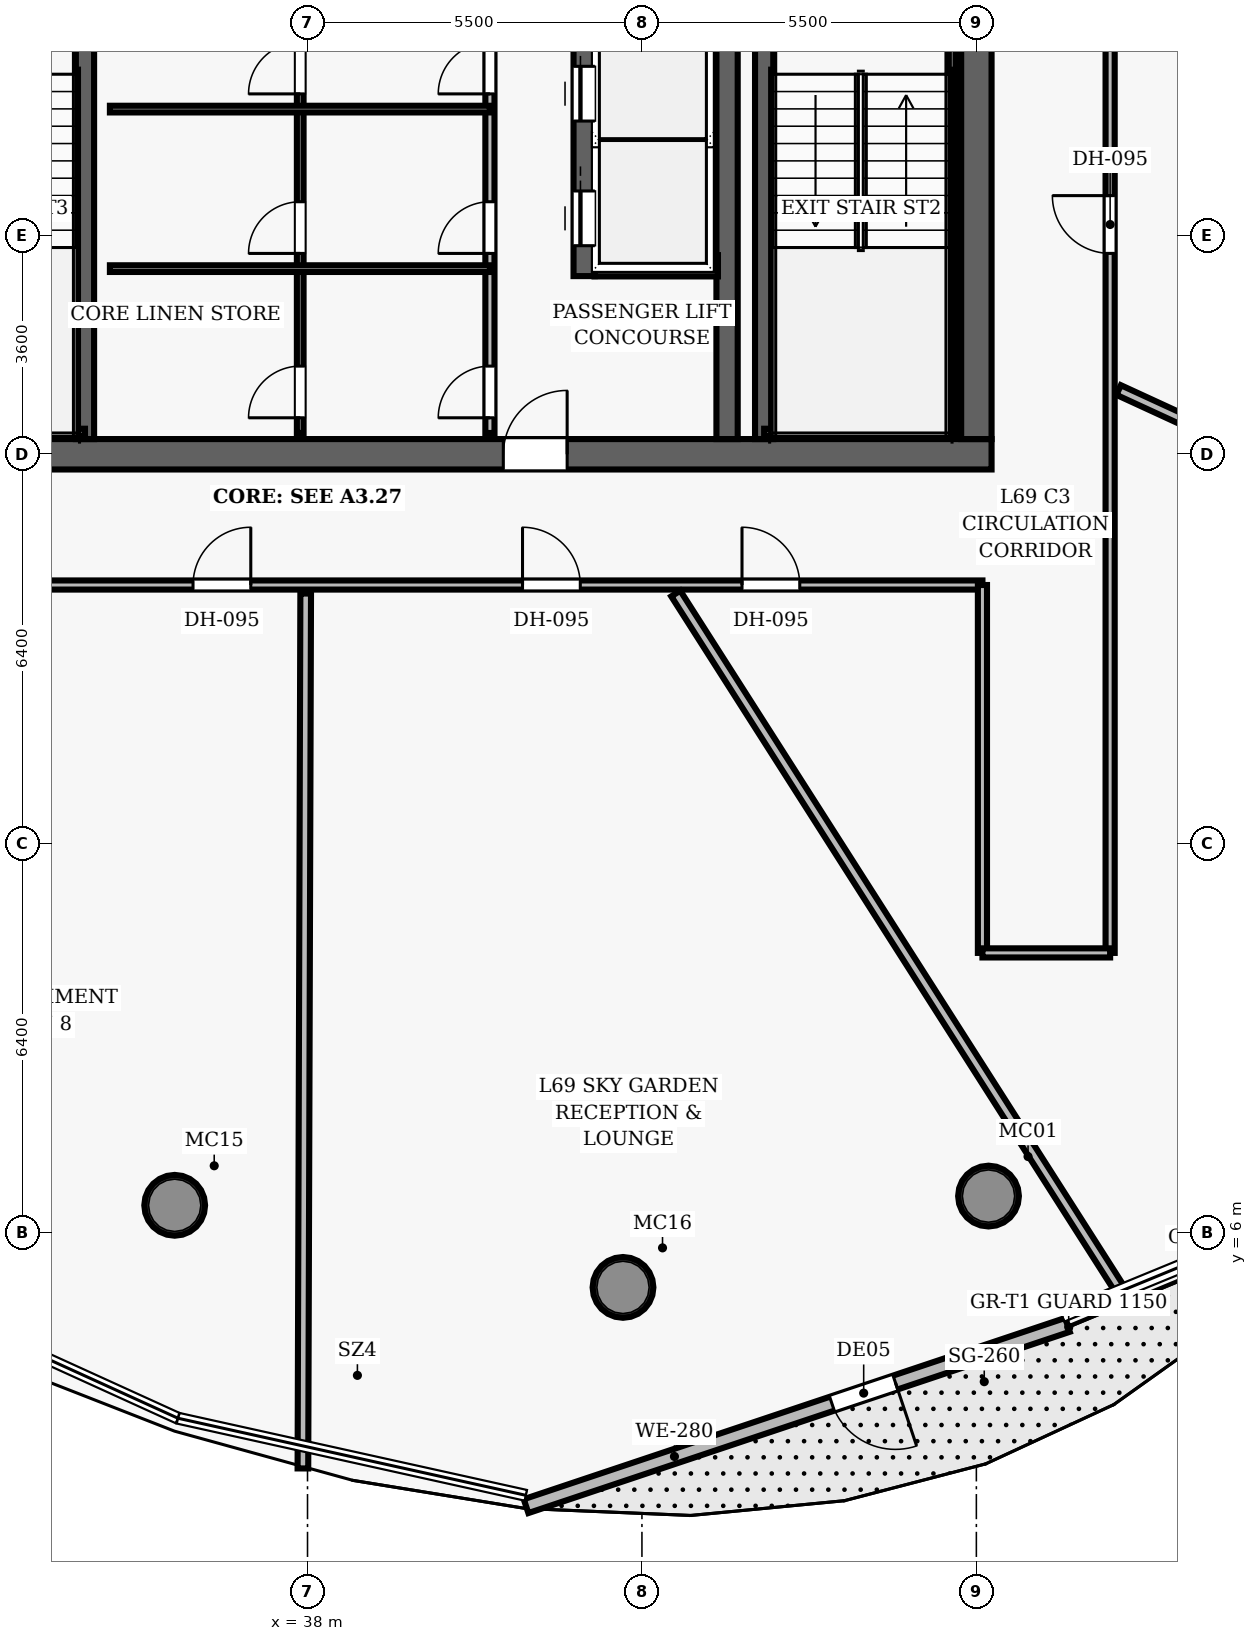
"""IFC4 building model, lengths in metres.
Left out: names, types, materials, properties, quantities, classifications, styles, units other than length and angle.
Written with IfcOpenShell. Run it as: python <this file> out.ifc"""

import sys

from ifc_helpers import new_model, si_unit, direction, frame, frame_2d, origin, origin_2d, place, context, subcontext, project, spatial, rectangle, hollow_circle, extrude, element, fill, save


model = new_model("IFC4")
c1 = context("Model", 3, precision=1e-05, world=origin(), true_north=direction((0.0, 1.0)))
c2 = subcontext(c1, "Body", "Model", "MODEL_VIEW")
j1 = project(units=[si_unit("LENGTHUNIT", "METRE"), si_unit("PLANEANGLEUNIT", "RADIAN")], contexts=[c1])
p1 = place(None, origin())
s1 = spatial("IfcSite", under=j1, at=p1, CompositionType="ELEMENT")
p2 = place(p1, origin())
s2 = spatial("IfcBuilding", under=s1, at=p2, CompositionType="ELEMENT")
p3 = place(p2, frame((0.0, 0.0, 272.85)))
s3 = spatial("IfcBuildingStorey", under=s2, at=p3, CompositionType="ELEMENT", Elevation=272.85)
p4 = place(p3, frame((26.75, 18.8, 0.0), z_axis=(0.0, 0.0, 1.0), x_axis=(1.0, 0.0, 0.0)))
e1 = element("IfcWall", 1, at=p4, inside=s3, PredefinedType="SHEAR", context=c2, shape_type="SweptSolid", body=[
    extrude(rectangle(XDim=22.5, YDim=0.5, at=frame_2d((11.25, 0.0))), origin(), (0.0, 0.0, 1.0), 3.85),
])
p5 = place(p4, frame((14.47, 0.0, 0.0)))
e2 = element("IfcOpeningElement", 2, at=p5, cuts=e1, PredefinedType="OPENING", context=c2, shape_type="SweptSolid", body=[
    extrude(rectangle(XDim=1.05, YDim=2.15, at=frame_2d((0.525, 1.075))), frame((0.0, 0.26, 0.0), z_axis=(0.0, -1.0, 0.0), x_axis=(1.0, 0.0, 0.0)), (0.0, 0.0, 1.0), 0.52),
])
p6 = place(p3, frame((49.0, 19.05, 0.0), z_axis=(0.0, 0.0, 1.0), x_axis=(0.0, 1.0, 0.0)))
e3 = element("IfcWall", 3, at=p6, inside=s3, PredefinedType="SHEAR", context=c2, shape_type="SweptSolid", body=[
    extrude(rectangle(XDim=13.9, YDim=0.5, at=frame_2d((6.95, 0.0))), origin(), (0.0, 0.0, 1.0), 3.85),
])
p7 = place(p6, frame((8.2, 0.0, 0.0)))
e4 = element("IfcOpeningElement", 4, at=p7, cuts=e3, PredefinedType="OPENING", context=c2, shape_type="SweptSolid", body=[
    extrude(rectangle(XDim=1.05, YDim=2.15, at=frame_2d((0.525, 1.075))), frame((0.0, 0.26, 0.0), z_axis=(0.0, -1.0, 0.0), x_axis=(1.0, 0.0, 0.0)), (0.0, 0.0, 1.0), 0.52),
])
p8 = place(p3, frame((44.9, 19.05, 0.0), z_axis=(0.0, 0.0, 1.0), x_axis=(0.0, 1.0, 0.0)))
e5 = element("IfcWall", 5, at=p8, inside=s3, PredefinedType="SHEAR", context=c2, shape_type="SweptSolid", body=[
    extrude(rectangle(XDim=13.9, YDim=0.35, at=frame_2d((6.95, 0.0))), origin(), (0.0, 0.0, 1.0), 3.85),
])
for number, where, z_axis, x_axis in (
    (6, (49.2, 6.601, 0.0), (0.0, 0.0, 1.0), (1.0, 0.0, 0.0)),
    (7, (35.815, 6.449, 0.0), (0.0, 0.0, 1.0), (1.0, 0.0, 0.0)),
    (8, (43.188, 5.099, 0.0), (0.0, 0.0, 1.0), (1.0, 0.0, 0.0)),
):
    element("IfcColumn", number, at=place(p3, frame(where, z_axis=z_axis, x_axis=x_axis)), inside=s3, PredefinedType="COLUMN", context=c2, shape_type="SweptSolid", body=[
        extrude(hollow_circle(Radius=0.5, WallThickness=0.045, at=origin_2d()), origin(), (0.0, 0.0, 1.0), 3.85),
    ])
p9 = place(p3, frame((45.51, 19.05, 0.0), z_axis=(0.0, 0.0, 1.0), x_axis=(0.0, 1.0, 0.0)))
e9 = element("IfcWall", 9, at=p9, inside=s3, PredefinedType="SHEAR", context=c2, shape_type="SweptSolid", body=[
    extrude(rectangle(XDim=7.5, YDim=0.3, at=frame_2d((3.75, 0.0))), origin(), (0.0, 0.0, 1.0), 3.85),
])
p10 = place(p3, frame((48.605, 19.1, 0.0), z_axis=(0.0, 0.0, 1.0), x_axis=(0.0, 1.0, 0.0)))
e10 = element("IfcWall", 10, at=p10, inside=s3, PredefinedType="SHEAR", context=c2, shape_type="SweptSolid", body=[
    extrude(rectangle(XDim=7.45, YDim=0.12, at=frame_2d((3.725, 0.0))), origin(), (0.0, 0.0, 1.0), 3.85),
])
p11 = place(p3, frame((45.51, 19.16, 0.0), z_axis=(0.0, 0.0, 1.0), x_axis=(1.0, 0.0, 0.0)))
e11 = element("IfcWall", 11, at=p11, inside=s3, PredefinedType="SHEAR", context=c2, shape_type="SweptSolid", body=[
    extrude(rectangle(XDim=3.095, YDim=0.12, at=frame_2d((1.547, 0.0))), origin(), (0.0, 0.0, 1.0), 3.85),
])
p12 = place(p3, frame((34.34, 19.05, 0.0), z_axis=(0.0, 0.0, 1.0), x_axis=(0.0, 1.0, 0.0)))
e12 = element("IfcWall", 12, at=p12, inside=s3, PredefinedType="SHEAR", context=c2, shape_type="SweptSolid", body=[
    extrude(rectangle(XDim=7.5, YDim=0.3, at=frame_2d((3.75, 0.0))), origin(), (0.0, 0.0, 1.0), 3.85),
])
p13 = place(p3, frame((31.3, 19.16, 0.0), z_axis=(0.0, 0.0, 1.0), x_axis=(1.0, 0.0, 0.0)))
e13 = element("IfcWall", 13, at=p13, inside=s3, PredefinedType="SHEAR", context=c2, shape_type="SweptSolid", body=[
    extrude(rectangle(XDim=3.04, YDim=0.12, at=frame_2d((1.52, 0.0))), origin(), (0.0, 0.0, 1.0), 3.85),
])
p14 = place(p3, frame((42.55, 21.73, 0.0), z_axis=(0.0, 0.0, 1.0), x_axis=(0.0, 1.0, 0.0)))
e14 = element("IfcWall", 14, at=p14, inside=s3, PredefinedType="SHEAR", context=c2, shape_type="SweptSolid", body=[
    extrude(rectangle(XDim=6.54, YDim=0.35, at=frame_2d((3.27, 0.0))), origin(), (0.0, 0.0, 1.0), 3.04),
])
p15 = place(p14, frame((0.5, 0.0, 0.0)))
e15 = element("IfcOpeningElement", 15, at=p15, cuts=e14, PredefinedType="OPENING", context=c2, shape_type="SweptSolid", body=[
    extrude(rectangle(XDim=0.9, YDim=2.15, at=frame_2d((0.45, 1.075))), frame((0.0, 0.185, 0.0), z_axis=(0.0, -1.0, 0.0), x_axis=(1.0, 0.0, 0.0)), (0.0, 0.0, 1.0), 0.37),
])
p16 = place(p14, frame((2.55, 0.0, 0.0)))
e16 = element("IfcOpeningElement", 16, at=p16, cuts=e14, PredefinedType="OPENING", context=c2, shape_type="SweptSolid", body=[
    extrude(rectangle(XDim=0.9, YDim=2.15, at=frame_2d((0.45, 1.075))), frame((0.0, 0.185, 0.0), z_axis=(0.0, -1.0, 0.0), x_axis=(1.0, 0.0, 0.0)), (0.0, 0.0, 1.0), 0.37),
])
p17 = place(p14, frame((4.6, 0.0, 0.0)))
e17 = element("IfcOpeningElement", 17, at=p17, cuts=e14, PredefinedType="OPENING", context=c2, shape_type="SweptSolid", body=[
    extrude(rectangle(XDim=0.9, YDim=2.15, at=frame_2d((0.45, 1.075))), frame((0.0, 0.185, 0.0), z_axis=(0.0, -1.0, 0.0), x_axis=(1.0, 0.0, 0.0)), (0.0, 0.0, 1.0), 0.37),
])
p18 = place(p3, frame((42.72, 21.9, 0.0), z_axis=(0.0, 0.0, 1.0), x_axis=(1.0, 0.0, 0.0)))
e18 = element("IfcWall", 18, at=p18, inside=s3, PredefinedType="SHEAR", context=c2, shape_type="SweptSolid", body=[
    extrude(rectangle(XDim=2.03, YDim=0.35, at=frame_2d((1.015, 0.0))), origin(), (0.0, 0.0, 1.0), 3.04),
])
p19 = place(p3, frame((41.0, 19.15, 0.0), z_axis=(0.0, 0.0, 1.0), x_axis=(0.0, 1.0, 0.0)))
e19 = element("IfcWall", 19, at=p19, inside=s3, PredefinedType="PARTITIONING", context=c2, shape_type="SweptSolid", body=[
    extrude(rectangle(XDim=7.95, YDim=0.15, at=frame_2d((3.975, 0.0))), origin(), (0.0, 0.0, 1.0), 3.04),
])
p20 = place(p19, frame((0.25, 0.0, 0.0)))
e20 = element("IfcOpeningElement", 20, at=p20, cuts=e19, PredefinedType="OPENING", context=c2, shape_type="SweptSolid", body=[
    extrude(rectangle(XDim=0.85, YDim=2.1, at=frame_2d((0.425, 1.05))), frame((0.0, 0.085, 0.0), z_axis=(0.0, -1.0, 0.0), x_axis=(1.0, 0.0, 0.0)), (0.0, 0.0, 1.0), 0.17),
])
p21 = place(p19, frame((2.953, 0.0, 0.0)))
e21 = element("IfcOpeningElement", 21, at=p21, cuts=e19, PredefinedType="OPENING", context=c2, shape_type="SweptSolid", body=[
    extrude(rectangle(XDim=0.85, YDim=2.1, at=frame_2d((0.425, 1.05))), frame((0.0, 0.085, 0.0), z_axis=(0.0, -1.0, 0.0), x_axis=(1.0, 0.0, 0.0)), (0.0, 0.0, 1.0), 0.17),
])
p22 = place(p19, frame((5.576, 0.0, 0.0)))
e22 = element("IfcOpeningElement", 22, at=p22, cuts=e19, PredefinedType="OPENING", context=c2, shape_type="SweptSolid", body=[
    extrude(rectangle(XDim=0.85, YDim=2.1, at=frame_2d((0.425, 1.05))), frame((0.0, 0.085, 0.0), z_axis=(0.0, -1.0, 0.0), x_axis=(1.0, 0.0, 0.0)), (0.0, 0.0, 1.0), 0.17),
])
p23 = place(p3, frame((37.88, 19.15, 0.0), z_axis=(0.0, 0.0, 1.0), x_axis=(0.0, 1.0, 0.0)))
e23 = element("IfcWall", 23, at=p23, inside=s3, PredefinedType="PARTITIONING", context=c2, shape_type="SweptSolid", body=[
    extrude(rectangle(XDim=7.95, YDim=0.11, at=frame_2d((3.975, 0.0))), origin(), (0.0, 0.0, 1.0), 3.04),
])
p24 = place(p23, frame((0.25, 0.0, 0.0)))
e24 = element("IfcOpeningElement", 24, at=p24, cuts=e23, PredefinedType="OPENING", context=c2, shape_type="SweptSolid", body=[
    extrude(rectangle(XDim=0.85, YDim=2.1, at=frame_2d((0.425, 1.05))), frame((0.0, 0.065, 0.0), z_axis=(0.0, -1.0, 0.0), x_axis=(1.0, 0.0, 0.0)), (0.0, 0.0, 1.0), 0.13),
])
p25 = place(p23, frame((2.953, 0.0, 0.0)))
e25 = element("IfcOpeningElement", 25, at=p25, cuts=e23, PredefinedType="OPENING", context=c2, shape_type="SweptSolid", body=[
    extrude(rectangle(XDim=0.85, YDim=2.1, at=frame_2d((0.425, 1.05))), frame((0.0, 0.065, 0.0), z_axis=(0.0, -1.0, 0.0), x_axis=(1.0, 0.0, 0.0)), (0.0, 0.0, 1.0), 0.13),
])
p26 = place(p23, frame((5.576, 0.0, 0.0)))
e26 = element("IfcOpeningElement", 26, at=p26, cuts=e23, PredefinedType="OPENING", context=c2, shape_type="SweptSolid", body=[
    extrude(rectangle(XDim=0.85, YDim=2.1, at=frame_2d((0.425, 1.05))), frame((0.0, 0.065, 0.0), z_axis=(0.0, -1.0, 0.0), x_axis=(1.0, 0.0, 0.0)), (0.0, 0.0, 1.0), 0.13),
])
for number, where, z_axis, x_axis in (
    (27, (34.75, 21.853, 0.0), (0.0, 0.0, 1.0), (1.0, 0.0, 0.0)),
    (28, (34.75, 24.477, 0.0), (0.0, 0.0, 1.0), (1.0, 0.0, 0.0)),
):
    element("IfcWall", number, at=place(p3, frame(where, z_axis=z_axis, x_axis=x_axis)), inside=s3, PredefinedType="PARTITIONING", context=c2, shape_type="SweptSolid", body=[
        extrude(rectangle(XDim=6.25, YDim=0.11, at=frame_2d((3.125, 0.0))), origin(), (0.0, 0.0, 1.0), 3.04),
    ])
p27 = place(p3, frame((26.9, 16.65, 0.0), z_axis=(0.0, 0.0, 1.0), x_axis=(1.0, 0.0, 0.0)))
e29 = element("IfcWall", 29, at=p27, inside=s3, PredefinedType="PARTITIONING", context=c2, shape_type="SweptSolid", body=[
    extrude(rectangle(XDim=22.2, YDim=0.15, at=frame_2d((11.1, 0.0))), origin(), (0.0, 0.0, 1.0), 3.04),
])
p28 = place(p27, frame((9.217, 0.0, 0.0)))
e30 = element("IfcOpeningElement", 30, at=p28, cuts=e29, PredefinedType="OPENING", context=c2, shape_type="SweptSolid", body=[
    extrude(rectangle(XDim=0.95, YDim=2.15, at=frame_2d((0.475, 1.075))), frame((0.0, 0.085, 0.0), z_axis=(0.0, -1.0, 0.0), x_axis=(1.0, 0.0, 0.0)), (0.0, 0.0, 1.0), 0.17),
])
p29 = place(p27, frame((14.636, 0.0, 0.0)))
e31 = element("IfcOpeningElement", 31, at=p29, cuts=e29, PredefinedType="OPENING", context=c2, shape_type="SweptSolid", body=[
    extrude(rectangle(XDim=0.95, YDim=2.15, at=frame_2d((0.475, 1.075))), frame((0.0, 0.085, 0.0), z_axis=(0.0, -1.0, 0.0), x_axis=(1.0, 0.0, 0.0)), (0.0, 0.0, 1.0), 0.17),
])
p30 = place(p27, frame((18.246, 0.0, 0.0)))
e32 = element("IfcOpeningElement", 32, at=p30, cuts=e29, PredefinedType="OPENING", context=c2, shape_type="SweptSolid", body=[
    extrude(rectangle(XDim=0.95, YDim=2.15, at=frame_2d((0.475, 1.075))), frame((0.0, 0.085, 0.0), z_axis=(0.0, -1.0, 0.0), x_axis=(1.0, 0.0, 0.0)), (0.0, 0.0, 1.0), 0.17),
])
p31 = place(p3, frame((51.2, 10.6, 0.0), z_axis=(0.0, 0.0, 1.0), x_axis=(0.0, 1.0, 0.0)))
e33 = element("IfcWall", 33, at=p31, inside=s3, PredefinedType="PARTITIONING", context=c2, shape_type="SweptSolid", body=[
    extrude(rectangle(XDim=30.126, YDim=0.15, at=frame_2d((15.063, 0.0))), origin(), (0.0, 0.0, 1.0), 3.04),
])
p32 = place(p31, frame((19.053, 0.0, 0.0)))
e34 = element("IfcOpeningElement", 34, at=p32, cuts=e33, PredefinedType="OPENING", context=c2, shape_type="SweptSolid", body=[
    extrude(rectangle(XDim=0.95, YDim=2.15, at=frame_2d((0.475, 1.075))), frame((0.0, 0.085, 0.0), z_axis=(0.0, -1.0, 0.0), x_axis=(1.0, 0.0, 0.0)), (0.0, 0.0, 1.0), 0.17),
])
p33 = place(p31, frame((11.504, 0.0, 0.0)))
e35 = element("IfcOpeningElement", 35, at=p33, cuts=e33, PredefinedType="OPENING", context=c2, shape_type="SweptSolid", body=[
    extrude(rectangle(XDim=0.95, YDim=2.15, at=frame_2d((0.475, 1.075))), frame((0.0, 0.085, 0.0), z_axis=(0.0, -1.0, 0.0), x_axis=(1.0, 0.0, 0.0)), (0.0, 0.0, 1.0), 0.17),
])
p34 = place(p3, frame((49.1, 10.6, 0.0), z_axis=(0.0, 0.0, 1.0), x_axis=(0.0, 1.0, 0.0)))
e36 = element("IfcWall", 36, at=p34, inside=s3, PredefinedType="PARTITIONING", context=c2, shape_type="SweptSolid", body=[
    extrude(rectangle(XDim=6.05, YDim=0.15, at=frame_2d((3.025, 0.0))), origin(), (0.0, 0.0, 1.0), 3.04),
])
p35 = place(p3, frame((49.1, 10.6, 0.0), z_axis=(0.0, 0.0, 1.0), x_axis=(1.0, 0.0, 0.0)))
e37 = element("IfcWall", 37, at=p35, inside=s3, PredefinedType="PARTITIONING", context=c2, shape_type="SweptSolid", body=[
    extrude(rectangle(XDim=2.1, YDim=0.15, at=frame_2d((1.05, 0.0))), origin(), (0.0, 0.0, 1.0), 3.04),
])
p36 = place(p3, frame((37.97, 16.51, 0.0), z_axis=(0.0, 0.0, 1.0), x_axis=(-0.003173025056, -0.999994965943, 0.0)))
e38 = element("IfcWall", 38, at=p36, inside=s3, PredefinedType="PARTITIONING", context=c2, shape_type="SweptSolid", body=[
    extrude(rectangle(XDim=14.388, YDim=0.175, at=frame_2d((7.194, 0.0))), origin(), (0.0, 0.0, 1.0), 3.04),
])
p37 = place(p3, frame((44.056, 16.51, 0.0), z_axis=(0.0, 0.0, 1.0), x_axis=(0.537965618689, -0.842966780549, 0.0)))
e39 = element("IfcWall", 39, at=p37, inside=s3, PredefinedType="PARTITIONING", context=c2, shape_type="SweptSolid", body=[
    extrude(rectangle(XDim=13.689, YDim=0.175, at=frame_2d((6.844, 0.0))), origin(), (0.0, 0.0, 1.0), 3.04),
])
p38 = place(p3, frame((51.34, 19.857, 0.0), z_axis=(0.0, 0.0, 1.0), x_axis=(0.90829671746, -0.41832651488, 0.0)))
e40 = element("IfcWall", 40, at=p38, inside=s3, PredefinedType="PARTITIONING", context=c2, shape_type="SweptSolid", body=[
    extrude(rectangle(XDim=8.741, YDim=0.175, at=frame_2d((4.37, 0.0))), origin(), (0.0, 0.0, 1.0), 3.04),
])
p39 = place(p3, frame((50.498, 4.482, 0.0), z_axis=(0.0, 0.0, 1.0), x_axis=(-0.948279524467, -0.317436518815, 0.0)))
e41 = element("IfcWall", 41, at=p39, inside=s3, PredefinedType="SOLIDWALL", context=c2, shape_type="SweptSolid", body=[
    extrude(rectangle(XDim=9.39, YDim=0.24, at=frame_2d((4.695, 0.0))), origin(), (0.0, 0.0, 1.0), 2.8),
])
p40 = place(p39, frame((2.984, 0.0, 0.0)))
e42 = element("IfcOpeningElement", 42, at=p40, cuts=e41, PredefinedType="OPENING", context=c2, shape_type="SweptSolid", body=[
    extrude(rectangle(XDim=1.1, YDim=2.2, at=frame_2d((0.55, 1.1))), frame((0.0, 0.13, 0.0), z_axis=(0.0, -1.0, 0.0), x_axis=(1.0, 0.0, 0.0)), (0.0, 0.0, 1.0), 0.26),
])
p41 = place(p5, origin())
e43 = element("IfcDoor", 43, at=p41, inside=s3, OperationType="SINGLE_SWING_RIGHT", PredefinedType="DOOR", context=c2, shape_type="SweptSolid", body=[
    extrude(rectangle(XDim=1.05, YDim=2.15, at=frame_2d((0.525, 1.075))), frame((0.0, 0.025, 0.0), z_axis=(0.0, -1.0, 0.0), x_axis=(1.0, 0.0, 0.0)), (0.0, 0.0, 1.0), 0.05),
])
fill(e2, e43)
p42 = place(p20, origin())
e44 = element("IfcDoor", 44, at=p42, inside=s3, OperationType="SINGLE_SWING_LEFT", PredefinedType="DOOR", context=c2, shape_type="SweptSolid", body=[
    extrude(rectangle(XDim=0.85, YDim=2.1, at=frame_2d((0.425, 1.05))), frame((0.0, 0.025, 0.0), z_axis=(0.0, -1.0, 0.0), x_axis=(1.0, 0.0, 0.0)), (0.0, 0.0, 1.0), 0.05),
])
fill(e20, e44)
p43 = place(p24, origin())
e45 = element("IfcDoor", 45, at=p43, inside=s3, OperationType="SINGLE_SWING_LEFT", PredefinedType="DOOR", context=c2, shape_type="SweptSolid", body=[
    extrude(rectangle(XDim=0.85, YDim=2.1, at=frame_2d((0.425, 1.05))), frame((0.0, 0.025, 0.0), z_axis=(0.0, -1.0, 0.0), x_axis=(1.0, 0.0, 0.0)), (0.0, 0.0, 1.0), 0.05),
])
fill(e24, e45)
p44 = place(p21, origin())
e46 = element("IfcDoor", 46, at=p44, inside=s3, OperationType="SINGLE_SWING_LEFT", PredefinedType="DOOR", context=c2, shape_type="SweptSolid", body=[
    extrude(rectangle(XDim=0.85, YDim=2.1, at=frame_2d((0.425, 1.05))), frame((0.0, 0.025, 0.0), z_axis=(0.0, -1.0, 0.0), x_axis=(1.0, 0.0, 0.0)), (0.0, 0.0, 1.0), 0.05),
])
fill(e21, e46)
p45 = place(p25, origin())
e47 = element("IfcDoor", 47, at=p45, inside=s3, OperationType="SINGLE_SWING_LEFT", PredefinedType="DOOR", context=c2, shape_type="SweptSolid", body=[
    extrude(rectangle(XDim=0.85, YDim=2.1, at=frame_2d((0.425, 1.05))), frame((0.0, 0.025, 0.0), z_axis=(0.0, -1.0, 0.0), x_axis=(1.0, 0.0, 0.0)), (0.0, 0.0, 1.0), 0.05),
])
fill(e25, e47)
p46 = place(p22, origin())
e48 = element("IfcDoor", 48, at=p46, inside=s3, OperationType="SINGLE_SWING_LEFT", PredefinedType="DOOR", context=c2, shape_type="SweptSolid", body=[
    extrude(rectangle(XDim=0.85, YDim=2.1, at=frame_2d((0.425, 1.05))), frame((0.0, 0.025, 0.0), z_axis=(0.0, -1.0, 0.0), x_axis=(1.0, 0.0, 0.0)), (0.0, 0.0, 1.0), 0.05),
])
fill(e22, e48)
p47 = place(p26, origin())
e49 = element("IfcDoor", 49, at=p47, inside=s3, OperationType="SINGLE_SWING_LEFT", PredefinedType="DOOR", context=c2, shape_type="SweptSolid", body=[
    extrude(rectangle(XDim=0.85, YDim=2.1, at=frame_2d((0.425, 1.05))), frame((0.0, 0.025, 0.0), z_axis=(0.0, -1.0, 0.0), x_axis=(1.0, 0.0, 0.0)), (0.0, 0.0, 1.0), 0.05),
])
fill(e26, e49)
p48 = place(p28, origin())
e50 = element("IfcDoor", 50, at=p48, inside=s3, OperationType="SINGLE_SWING_RIGHT", PredefinedType="DOOR", context=c2, shape_type="SweptSolid", body=[
    extrude(rectangle(XDim=0.95, YDim=2.15, at=frame_2d((0.475, 1.075))), frame((0.0, 0.025, 0.0), z_axis=(0.0, -1.0, 0.0), x_axis=(1.0, 0.0, 0.0)), (0.0, 0.0, 1.0), 0.05),
])
fill(e30, e50)
p49 = place(p29, origin())
e51 = element("IfcDoor", 51, at=p49, inside=s3, OperationType="SINGLE_SWING_LEFT", PredefinedType="DOOR", context=c2, shape_type="SweptSolid", body=[
    extrude(rectangle(XDim=0.95, YDim=2.15, at=frame_2d((0.475, 1.075))), frame((0.0, 0.025, 0.0), z_axis=(0.0, -1.0, 0.0), x_axis=(1.0, 0.0, 0.0)), (0.0, 0.0, 1.0), 0.05),
])
fill(e31, e51)
p50 = place(p30, origin())
e52 = element("IfcDoor", 52, at=p50, inside=s3, OperationType="SINGLE_SWING_LEFT", PredefinedType="DOOR", context=c2, shape_type="SweptSolid", body=[
    extrude(rectangle(XDim=0.95, YDim=2.15, at=frame_2d((0.475, 1.075))), frame((0.0, 0.025, 0.0), z_axis=(0.0, -1.0, 0.0), x_axis=(1.0, 0.0, 0.0)), (0.0, 0.0, 1.0), 0.05),
])
fill(e32, e52)
p51 = place(p33, origin())
e53 = element("IfcDoor", 53, at=p51, inside=s3, OperationType="SINGLE_SWING_RIGHT", PredefinedType="DOOR", context=c2, shape_type="SweptSolid", body=[
    extrude(rectangle(XDim=0.95, YDim=2.15, at=frame_2d((0.475, 1.075))), frame((0.0, 0.025, 0.0), z_axis=(0.0, -1.0, 0.0), x_axis=(1.0, 0.0, 0.0)), (0.0, 0.0, 1.0), 0.05),
])
fill(e35, e53)
p52 = place(p15, origin())
e54 = element("IfcDoor", 54, at=p52, inside=s3, OperationType="SLIDING_TO_LEFT", PredefinedType="DOOR", context=c2, shape_type="SweptSolid", body=[
    extrude(rectangle(XDim=0.9, YDim=2.15, at=frame_2d((0.45, 1.075))), frame((0.0, 0.025, 0.0), z_axis=(0.0, -1.0, 0.0), x_axis=(1.0, 0.0, 0.0)), (0.0, 0.0, 1.0), 0.05),
])
fill(e15, e54)
p53 = place(p16, origin())
e55 = element("IfcDoor", 55, at=p53, inside=s3, OperationType="SLIDING_TO_LEFT", PredefinedType="DOOR", context=c2, shape_type="SweptSolid", body=[
    extrude(rectangle(XDim=0.9, YDim=2.15, at=frame_2d((0.45, 1.075))), frame((0.0, 0.025, 0.0), z_axis=(0.0, -1.0, 0.0), x_axis=(1.0, 0.0, 0.0)), (0.0, 0.0, 1.0), 0.05),
])
fill(e16, e55)
p54 = place(p40, origin())
e56 = element("IfcDoor", 56, at=p54, inside=s3, OperationType="SINGLE_SWING_LEFT", PredefinedType="DOOR", context=c2, shape_type="SweptSolid", body=[
    extrude(rectangle(XDim=1.1, YDim=2.2, at=frame_2d((0.55, 1.1))), frame((0.0, 0.025, 0.0), z_axis=(0.0, -1.0, 0.0), x_axis=(1.0, 0.0, 0.0)), (0.0, 0.0, 1.0), 0.05),
])
fill(e42, e56)
save(model, sys.argv[1])
